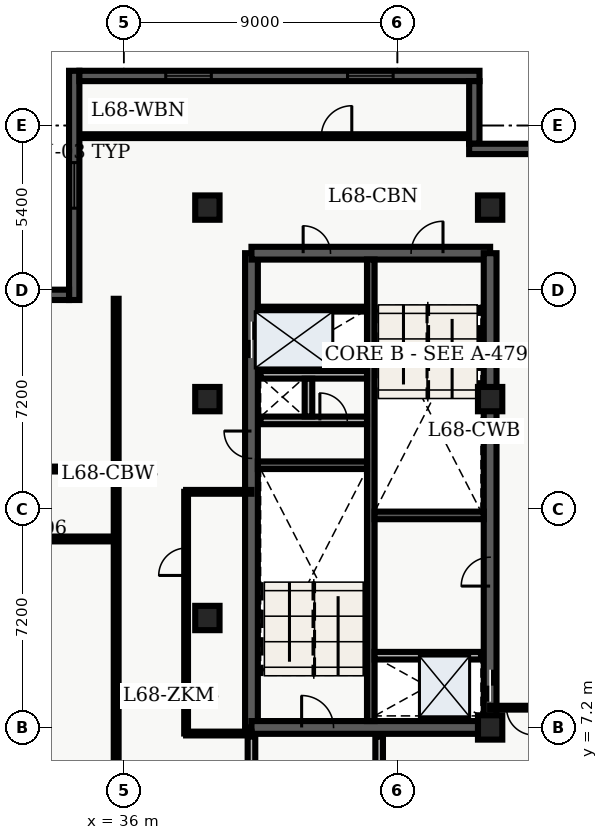
"""IFC4 building model, lengths in metres.
Left out: names, types, materials, properties, quantities, classifications, styles, units other than length and angle.
Written with IfcOpenShell. Run it as: python <this file> out.ifc"""

import sys

from ifc_helpers import new_model, entity, si_unit, converted_unit, direction, frame, origin_with_axes, origin_2d_with_axis, place, context, subcontext, project, spatial, polyline, rectangle, outline, extrude, element, fill, save


model = new_model("IFC4")
c1 = context("Model", 3, precision=1e-05, world=origin_with_axes(), true_north=direction((0.0, 1.0)))
c2 = subcontext(c1, "Body", "Model", "MODEL_VIEW")
j1 = project(units=[si_unit("LENGTHUNIT", "METRE"), converted_unit("PLANEANGLEUNIT", "DEGREE", entity("IfcPlaneAngleMeasure", 0.017), si_unit("PLANEANGLEUNIT", "RADIAN"), dimensions=[0, 0, 0, 0, 0, 0, 0])], contexts=[c1])
p1 = place(None, origin_with_axes())
s1 = spatial("IfcSite", under=j1, at=p1, CompositionType="ELEMENT")
p2 = place(p1, origin_with_axes())
s2 = spatial("IfcBuilding", under=s1, at=p2, CompositionType="ELEMENT")
p3 = place(p2, frame((0.0, 0.0, 276.3), z_axis=(0.0, 0.0, 1.0), x_axis=(1.0, 0.0, 0.0)))
s3 = spatial("IfcBuildingStorey", under=s2, at=p3, CompositionType="ELEMENT", Elevation=276.3)
p4 = place(p3, frame((40.2, 7.2, 0.0), z_axis=(0.0, 0.0, 1.0), x_axis=(0.0, 1.0, 0.0)))
e1 = element("IfcWall", 1, at=p4, inside=s3, PredefinedType="SHEAR", context=c2, shape_type="SweptSolid", body=[
    extrude(outline(polyline([(0.0, -0.21), (15.6, -0.21), (15.6, 0.21), (0.0, 0.21), (0.0, -0.21)])), origin_with_axes(), (0.0, 0.0, 1.0), 3.66),
])
p5 = place(p4, frame((12.75, 0.0, 0.0), z_axis=(0.0, 0.0, 1.0), x_axis=(1.0, 0.0, 0.0)))
e2 = element("IfcOpeningElement", 2, at=p5, cuts=e1, PredefinedType="OPENING", context=c2, shape_type="SweptSolid", body=[
    extrude(rectangle(XDim=1.2, YDim=0.44, at=origin_2d_with_axis()), origin_with_axes(), (0.0, 0.0, 1.0), 2.15),
])
p6 = place(p4, frame((9.3, 0.0, 0.0), z_axis=(0.0, 0.0, 1.0), x_axis=(1.0, 0.0, 0.0)))
e3 = element("IfcOpeningElement", 3, at=p6, cuts=e1, PredefinedType="OPENING", context=c2, shape_type="SweptSolid", body=[
    extrude(rectangle(XDim=0.9, YDim=0.44, at=origin_2d_with_axis()), origin_with_axes(), (0.0, 0.0, 1.0), 2.15),
])
p7 = place(p3, frame((40.2, 7.2, 0.0), z_axis=(0.0, 0.0, 1.0), x_axis=(1.0, 0.0, 0.0)))
e4 = element("IfcWall", 4, at=p7, inside=s3, PredefinedType="SHEAR", context=c2, shape_type="SweptSolid", body=[
    extrude(outline(polyline([(0.0, -0.21), (7.85, -0.21), (7.85, 0.21), (0.0, 0.21), (0.0, -0.21)])), origin_with_axes(), (0.0, 0.0, 1.0), 3.66),
])
p8 = place(p7, frame((2.175, 0.0, 0.0), z_axis=(0.0, 0.0, 1.0), x_axis=(1.0, 0.0, 0.0)))
e5 = element("IfcOpeningElement", 5, at=p8, cuts=e4, PredefinedType="OPENING", context=c2, shape_type="SweptSolid", body=[
    extrude(rectangle(XDim=1.05, YDim=0.44, at=origin_2d_with_axis()), origin_with_axes(), (0.0, 0.0, 1.0), 2.15),
])
p9 = place(p3, frame((40.2, 22.8, 0.0), z_axis=(0.0, 0.0, 1.0), x_axis=(1.0, 0.0, 0.0)))
e6 = element("IfcWall", 6, at=p9, inside=s3, PredefinedType="SHEAR", context=c2, shape_type="SweptSolid", body=[
    extrude(outline(polyline([(0.0, -0.21), (7.85, -0.21), (7.85, 0.21), (0.0, 0.21), (0.0, -0.21)])), origin_with_axes(), (0.0, 0.0, 1.0), 3.66),
])
p10 = place(p9, frame((5.775, 0.0, 0.0), z_axis=(0.0, 0.0, 1.0), x_axis=(1.0, 0.0, 0.0)))
e7 = element("IfcOpeningElement", 7, at=p10, cuts=e6, PredefinedType="OPENING", context=c2, shape_type="SweptSolid", body=[
    extrude(rectangle(XDim=1.05, YDim=0.44, at=origin_2d_with_axis()), origin_with_axes(), (0.0, 0.0, 1.0), 2.15),
])
p11 = place(p9, frame((2.15, 0.0, 0.0), z_axis=(0.0, 0.0, 1.0), x_axis=(1.0, 0.0, 0.0)))
e8 = element("IfcOpeningElement", 8, at=p11, cuts=e6, PredefinedType="OPENING", context=c2, shape_type="SweptSolid", body=[
    extrude(rectangle(XDim=0.9, YDim=0.44, at=origin_2d_with_axis()), origin_with_axes(), (0.0, 0.0, 1.0), 2.15),
])
p12 = place(p3, frame((48.05, 7.2, 0.0), z_axis=(0.0, 0.0, 1.0), x_axis=(0.0, 1.0, 0.0)))
e9 = element("IfcWall", 9, at=p12, inside=s3, PredefinedType="SHEAR", context=c2, shape_type="SweptSolid", body=[
    extrude(outline(polyline([(0.0, -0.21), (15.6, -0.21), (15.6, 0.21), (0.0, 0.21), (0.0, -0.21)])), origin_with_axes(), (0.0, 0.0, 1.0), 3.66),
])
p13 = place(p12, frame((1.375, 0.0, 0.0), z_axis=(0.0, 0.0, 1.0), x_axis=(1.0, 0.0, 0.0)))
e10 = element("IfcOpeningElement", 10, at=p13, cuts=e9, PredefinedType="OPENING", context=c2, shape_type="SweptSolid", body=[
    extrude(rectangle(XDim=1.05, YDim=0.44, at=origin_2d_with_axis()), origin_with_axes(), (0.0, 0.0, 1.0), 2.15),
])
p14 = place(p12, frame((5.125, 0.0, 0.0), z_axis=(0.0, 0.0, 1.0), x_axis=(1.0, 0.0, 0.0)))
e11 = element("IfcOpeningElement", 11, at=p14, cuts=e9, PredefinedType="OPENING", context=c2, shape_type="SweptSolid", body=[
    extrude(rectangle(XDim=0.95, YDim=0.44, at=origin_2d_with_axis()), origin_with_axes(), (0.0, 0.0, 1.0), 2.15),
])
p15 = place(p3, frame((44.125, 7.41, 0.0), z_axis=(0.0, 0.0, 1.0), x_axis=(0.0, 1.0, 0.0)))
e12 = element("IfcWall", 12, at=p15, inside=s3, PredefinedType="SHEAR", context=c2, shape_type="SweptSolid", body=[
    extrude(outline(polyline([(0.0, -0.125), (15.18, -0.125), (15.18, 0.125), (0.0, 0.125), (0.0, -0.125)])), origin_with_axes(), (0.0, 0.0, 1.0), 3.66),
])
for number, where, z_axis, x_axis in (
    (13, (40.41, 15.825, 0.0), (0.0, 0.0, 1.0), (1.0, 0.0, 0.0)),
    (14, (44.25, 14.175, 0.0), (0.0, 0.0, 1.0), (1.0, 0.0, 0.0)),
):
    element("IfcWall", number, at=place(p3, frame(where, z_axis=z_axis, x_axis=x_axis)), inside=s3, PredefinedType="SHEAR", context=c2, shape_type="SweptSolid", body=[
        extrude(outline(polyline([(0.0, -0.125), (3.59, -0.125), (3.59, 0.125), (0.0, 0.125), (0.0, -0.125)])), origin_with_axes(), (0.0, 0.0, 1.0), 3.66),
    ])
p16 = place(p3, frame((40.5, 17.3, 0.0), z_axis=(0.0, 0.0, 1.0), x_axis=(1.0, 0.0, 0.0)))
e15 = element("IfcWall", 15, at=p16, inside=s3, PredefinedType="SOLIDWALL", context=c2, shape_type="SweptSolid", body=[
    extrude(outline(polyline([(0.0, -0.125), (3.5, -0.125), (3.5, 0.125), (0.0, 0.125), (0.0, -0.125)])), origin_with_axes(), (0.0, 0.0, 1.0), 2.7),
])
p17 = place(p16, frame((2.4, 0.0, 0.0), z_axis=(0.0, 0.0, 1.0), x_axis=(1.0, 0.0, 0.0)))
e16 = element("IfcOpeningElement", 16, at=p17, cuts=e15, PredefinedType="OPENING", context=c2, shape_type="SweptSolid", body=[
    extrude(rectangle(XDim=0.9, YDim=0.27, at=origin_2d_with_axis()), origin_with_axes(), (0.0, 0.0, 1.0), 2.15),
])
p18 = place(p3, frame((40.5, 18.8, 0.0), z_axis=(0.0, 0.0, 1.0), x_axis=(1.0, 0.0, 0.0)))
e17 = element("IfcWall", 17, at=p18, inside=s3, PredefinedType="SOLIDWALL", context=c2, shape_type="SweptSolid", body=[
    extrude(outline(polyline([(0.0, -0.125), (3.5, -0.125), (3.5, 0.125), (0.0, 0.125), (0.0, -0.125)])), origin_with_axes(), (0.0, 0.0, 1.0), 2.7),
])
p19 = place(p3, frame((42.075, 17.43, 0.0), z_axis=(0.0, 0.0, 1.0), x_axis=(0.0, 1.0, 0.0)))
e18 = element("IfcWall", 18, at=p19, inside=s3, PredefinedType="SOLIDWALL", context=c2, shape_type="SweptSolid", body=[
    extrude(outline(polyline([(0.0, -0.125), (1.24, -0.125), (1.24, 0.125), (0.0, 0.125), (0.0, -0.125)])), origin_with_axes(), (0.0, 0.0, 1.0), 2.7),
])
p20 = place(p3, frame((40.2, 3.1, 0.0), z_axis=(0.0, 0.0, 1.0), x_axis=(0.0, 1.0, 0.0)))
e19 = element("IfcWall", 19, at=p20, inside=s3, PredefinedType="SOLIDWALL", context=c2, shape_type="SweptSolid", body=[
    extrude(outline(polyline([(0.0, -0.125), (3.8, -0.125), (3.8, 0.125), (0.0, 0.125), (0.0, -0.125)])), origin_with_axes(), (0.0, 0.0, 1.0), 2.7),
])
p21 = place(p20, frame((2.075, 0.0, 0.0), z_axis=(0.0, 0.0, 1.0), x_axis=(1.0, 0.0, 0.0)))
e20 = element("IfcOpeningElement", 20, at=p21, cuts=e19, PredefinedType="OPENING", context=c2, shape_type="SweptSolid", body=[
    extrude(rectangle(XDim=1.05, YDim=0.27, at=origin_2d_with_axis()), origin_with_axes(), (0.0, 0.0, 1.0), 2.15),
])
p22 = place(p3, frame((44.4, 3.1, 0.0), z_axis=(0.0, 0.0, 1.0), x_axis=(0.0, 1.0, 0.0)))
e21 = element("IfcWall", 21, at=p22, inside=s3, PredefinedType="SOLIDWALL", context=c2, shape_type="SweptSolid", body=[
    extrude(outline(polyline([(0.0, -0.125), (3.8, -0.125), (3.8, 0.125), (0.0, 0.125), (0.0, -0.125)])), origin_with_axes(), (0.0, 0.0, 1.0), 2.7),
])
for number, where, z_axis, x_axis in (
    (22, (38.75, 10.8, 0.0), (0.0, 0.0, 1.0), (1.0, 0.0, 0.0)),
    (23, (38.75, 18.0, 0.0), (0.0, 0.0, 1.0), (1.0, 0.0, 0.0)),
    (24, (38.75, 24.3, 0.0), (0.0, 0.0, 1.0), (1.0, 0.0, 0.0)),
    (25, (48.05, 7.2, 0.0), (0.0, 0.0, 1.0), (1.0, 0.0, 0.0)),
    (26, (48.05, 18.0, 0.0), (0.0, 0.0, 1.0), (1.0, 0.0, 0.0)),
    (27, (48.05, 24.3, 0.0), (0.0, 0.0, 1.0), (1.0, 0.0, 0.0)),
):
    element("IfcColumn", number, at=place(p3, frame(where, z_axis=z_axis, x_axis=x_axis)), inside=s3, PredefinedType="COLUMN", context=c2, shape_type="SweptSolid", body=[
        extrude(rectangle(XDim=0.8, YDim=0.8, at=origin_2d_with_axis()), origin_with_axes(), (0.0, 0.0, 1.0), 3.9),
    ])
p23 = place(p3, frame((40.5, 20.96, 0.0), z_axis=(0.0, 0.0, 1.0), x_axis=(1.0, 0.0, 0.0)))
e28 = element("IfcWall", 28, at=p23, inside=s3, PredefinedType="PARTITIONING", context=c2, shape_type="SweptSolid", body=[
    extrude(outline(polyline([(0.0, -0.08), (3.5, -0.08), (3.5, 0.08), (0.0, 0.08), (0.0, -0.08)])), origin_with_axes(), (0.0, 0.0, 1.0), 2.7),
])
p24 = place(p3, frame((44.25, 9.56, 0.0), z_axis=(0.0, 0.0, 1.0), x_axis=(1.0, 0.0, 0.0)))
e29 = element("IfcWall", 29, at=p24, inside=s3, PredefinedType="SOLIDWALL", context=c2, shape_type="SweptSolid", body=[
    extrude(outline(polyline([(0.0, -0.125), (3.5, -0.125), (3.5, 0.125), (0.0, 0.125), (0.0, -0.125)])), origin_with_axes(), (0.0, 0.0, 1.0), 2.7),
])
p25 = place(p3, frame((20.3, 13.4, 0.0), z_axis=(0.0, 0.0, 1.0), x_axis=(1.0, 0.0, 0.0)))
e30 = element("IfcWall", 30, at=p25, inside=s3, PredefinedType="PARTITIONING", context=c2, shape_type="SweptSolid", body=[
    extrude(outline(polyline([(0.0, -0.08), (15.45, -0.08), (15.45, 0.08), (0.0, 0.08), (0.0, -0.08)])), origin_with_axes(), (0.0, 0.0, 1.0), 2.7),
])
p26 = place(p25, frame((2.34, 0.0, 0.0), z_axis=(0.0, 0.0, 1.0), x_axis=(1.0, 0.0, 0.0)))
e31 = element("IfcOpeningElement", 31, at=p26, cuts=e30, PredefinedType="OPENING", context=c2, shape_type="SweptSolid", body=[
    extrude(rectangle(XDim=1.0, YDim=0.18, at=origin_2d_with_axis()), origin_with_axes(), (0.0, 0.0, 1.0), 2.15),
])
p27 = place(p25, frame((7.011, 0.0, 0.0), z_axis=(0.0, 0.0, 1.0), x_axis=(1.0, 0.0, 0.0)))
e32 = element("IfcOpeningElement", 32, at=p27, cuts=e30, PredefinedType="OPENING", context=c2, shape_type="SweptSolid", body=[
    extrude(rectangle(XDim=1.0, YDim=0.18, at=origin_2d_with_axis()), origin_with_axes(), (0.0, 0.0, 1.0), 2.15),
])
p28 = place(p25, frame((12.445, 0.0, 0.0), z_axis=(0.0, 0.0, 1.0), x_axis=(1.0, 0.0, 0.0)))
e33 = element("IfcOpeningElement", 33, at=p28, cuts=e30, PredefinedType="OPENING", context=c2, shape_type="SweptSolid", body=[
    extrude(rectangle(XDim=1.2, YDim=0.18, at=origin_2d_with_axis()), origin_with_axes(), (0.0, 0.0, 1.0), 2.2),
])
p29 = place(p3, frame((20.3, 15.7, 0.0), z_axis=(0.0, 0.0, 1.0), x_axis=(1.0, 0.0, 0.0)))
e34 = element("IfcWall", 34, at=p29, inside=s3, PredefinedType="PARTITIONING", context=c2, shape_type="SweptSolid", body=[
    extrude(outline(polyline([(0.0, -0.08), (15.45, -0.08), (15.45, 0.08), (0.0, 0.08), (0.0, -0.08)])), origin_with_axes(), (0.0, 0.0, 1.0), 2.7),
])
p30 = place(p29, frame((7.775, 0.0, 0.0), z_axis=(0.0, 0.0, 1.0), x_axis=(1.0, 0.0, 0.0)))
e35 = element("IfcOpeningElement", 35, at=p30, cuts=e34, PredefinedType="OPENING", context=c2, shape_type="SweptSolid", body=[
    extrude(rectangle(XDim=1.0, YDim=0.18, at=origin_2d_with_axis()), origin_with_axes(), (0.0, 0.0, 1.0), 2.15),
])
p31 = place(p3, frame((35.75, 4.35, 0.0), z_axis=(0.0, 0.0, 1.0), x_axis=(0.0, 1.0, 0.0)))
e36 = element("IfcWall", 36, at=p31, inside=s3, PredefinedType="PARTITIONING", context=c2, shape_type="SweptSolid", body=[
    extrude(outline(polyline([(0.0, -0.08), (16.95, -0.08), (16.95, 0.08), (0.0, 0.08), (0.0, -0.08)])), origin_with_axes(), (0.0, 0.0, 1.0), 2.7),
])
p32 = place(p3, frame((49.765, 7.85, 0.0), z_axis=(0.0, 0.0, 1.0), x_axis=(-1.0, 0.0, 0.0)))
e37 = element("IfcWall", 37, at=p32, inside=s3, PredefinedType="PARTITIONING", context=c2, shape_type="SweptSolid", body=[
    extrude(outline(polyline([(0.0, -0.062), (1.715, -0.062), (1.715, 0.062), (0.0, 0.062), (0.0, -0.062)])), origin_with_axes(), (0.0, 0.0, 1.0), 2.7),
])
p33 = place(p32, frame((0.725, 0.0, 0.0), z_axis=(0.0, 0.0, 1.0), x_axis=(1.0, 0.0, 0.0)))
e38 = element("IfcOpeningElement", 38, at=p33, cuts=e37, PredefinedType="OPENING", context=c2, shape_type="SweptSolid", body=[
    extrude(rectangle(XDim=0.9, YDim=0.145, at=origin_2d_with_axis()), origin_with_axes(), (0.0, 0.0, 1.0), 2.15),
])
p34 = place(p3, frame((34.535, 26.65, 0.0), z_axis=(0.0, 0.0, 1.0), x_axis=(1.0, 0.0, 0.0)))
e39 = element("IfcWall", 39, at=p34, inside=s3, PredefinedType="PARTITIONING", context=c2, shape_type="SweptSolid", body=[
    extrude(outline(polyline([(0.0, -0.062), (12.995, -0.062), (12.995, 0.062), (0.0, 0.062), (0.0, -0.062)])), origin_with_axes(), (0.0, 0.0, 1.0), 2.7),
])
p35 = place(p34, frame((8.465, 0.0, 0.0), z_axis=(0.0, 0.0, 1.0), x_axis=(1.0, 0.0, 0.0)))
e40 = element("IfcOpeningElement", 40, at=p35, cuts=e39, PredefinedType="OPENING", context=c2, shape_type="SweptSolid", body=[
    extrude(rectangle(XDim=1.0, YDim=0.145, at=origin_2d_with_axis()), origin_with_axes(), (0.0, 0.0, 1.0), 2.15),
])
for number, where, z_axis, x_axis in (
    (41, (38.05, 7.0, 0.0), (0.0, 0.0, 1.0), (1.0, 0.0, 0.0)),
    (42, (38.05, 14.95, 0.0), (0.0, 0.0, 1.0), (1.0, 0.0, 0.0)),
):
    element("IfcWall", number, at=place(p3, frame(where, z_axis=z_axis, x_axis=x_axis)), inside=s3, PredefinedType="PARTITIONING", context=c2, shape_type="SweptSolid", body=[
        extrude(outline(polyline([(0.0, -0.062), (2.15, -0.062), (2.15, 0.062), (0.0, 0.062), (0.0, -0.062)])), origin_with_axes(), (0.0, 0.0, 1.0), 2.7),
    ])
p36 = place(p3, frame((38.05, 7.0, 0.0), z_axis=(0.0, 0.0, 1.0), x_axis=(0.0, 1.0, 0.0)))
e43 = element("IfcWall", 43, at=p36, inside=s3, PredefinedType="PARTITIONING", context=c2, shape_type="SweptSolid", body=[
    extrude(outline(polyline([(0.0, -0.062), (7.95, -0.062), (7.95, 0.062), (0.0, 0.062), (0.0, -0.062)])), origin_with_axes(), (0.0, 0.0, 1.0), 2.7),
])
p37 = place(p36, frame((5.65, 0.0, 0.0), z_axis=(0.0, 0.0, 1.0), x_axis=(1.0, 0.0, 0.0)))
e44 = element("IfcOpeningElement", 44, at=p37, cuts=e43, PredefinedType="OPENING", context=c2, shape_type="SweptSolid", body=[
    extrude(rectangle(XDim=0.9, YDim=0.145, at=origin_2d_with_axis()), origin_with_axes(), (0.0, 0.0, 1.0), 2.15),
])
p38 = place(p3, frame((34.37, 21.26, 0.0), z_axis=(0.0, 0.0, 1.0), x_axis=(0.0, 1.0, 0.0)))
e45 = element("IfcWall", 45, at=p38, inside=s3, PredefinedType="SOLIDWALL", context=c2, shape_type="SweptSolid", body=[
    extrude(outline(polyline([(0.0, -0.17), (7.54, -0.17), (7.54, 0.17), (0.0, 0.17), (0.0, -0.17)])), origin_with_axes(), (0.0, 0.0, 1.0), 3.66),
])
p39 = place(p38, frame((3.77, 0.0, 0.45), z_axis=(0.0, 0.0, 1.0), x_axis=(1.0, 0.0, 0.0)))
e46 = element("IfcOpeningElement", 46, at=p39, cuts=e45, PredefinedType="OPENING", context=c2, shape_type="SweptSolid", body=[
    extrude(rectangle(XDim=1.5, YDim=0.36, at=origin_2d_with_axis()), origin_with_axes(), (0.0, 0.0, 1.0), 2.1),
])
p40 = place(p3, frame((34.54, 28.63, 0.0), z_axis=(0.0, 0.0, 1.0), x_axis=(1.0, 0.0, 0.0)))
e47 = element("IfcWall", 47, at=p40, inside=s3, PredefinedType="SOLIDWALL", context=c2, shape_type="SweptSolid", body=[
    extrude(outline(polyline([(0.0, -0.17), (13.16, -0.17), (13.16, 0.17), (0.0, 0.17), (0.0, -0.17)])), origin_with_axes(), (0.0, 0.0, 1.0), 3.66),
])
p41 = place(p40, frame((3.59, 0.0, 0.45), z_axis=(0.0, 0.0, 1.0), x_axis=(1.0, 0.0, 0.0)))
e48 = element("IfcOpeningElement", 48, at=p41, cuts=e47, PredefinedType="OPENING", context=c2, shape_type="SweptSolid", body=[
    extrude(rectangle(XDim=1.5, YDim=0.36, at=origin_2d_with_axis()), origin_with_axes(), (0.0, 0.0, 1.0), 2.1),
])
p42 = place(p40, frame((9.57, 0.0, 0.45), z_axis=(0.0, 0.0, 1.0), x_axis=(1.0, 0.0, 0.0)))
e49 = element("IfcOpeningElement", 49, at=p42, cuts=e47, PredefinedType="OPENING", context=c2, shape_type="SweptSolid", body=[
    extrude(rectangle(XDim=1.5, YDim=0.36, at=origin_2d_with_axis()), origin_with_axes(), (0.0, 0.0, 1.0), 2.1),
])
p43 = place(p3, frame((47.53, 28.46, 0.0), z_axis=(0.0, 0.0, 1.0), x_axis=(0.0, -1.0, 0.0)))
e50 = element("IfcWall", 50, at=p43, inside=s3, PredefinedType="SOLIDWALL", context=c2, shape_type="SweptSolid", body=[
    extrude(outline(polyline([(0.0, -0.17), (2.06, -0.17), (2.06, 0.17), (0.0, 0.17), (0.0, -0.17)])), origin_with_axes(), (0.0, 0.0, 1.0), 3.66),
])
p44 = place(p3, frame((47.36, 26.23, 0.0), z_axis=(0.0, 0.0, 1.0), x_axis=(1.0, 0.0, 0.0)))
e51 = element("IfcWall", 51, at=p44, inside=s3, PredefinedType="SOLIDWALL", context=c2, shape_type="SweptSolid", body=[
    extrude(outline(polyline([(0.0, -0.17), (2.74, -0.17), (2.74, 0.17), (0.0, 0.17), (0.0, -0.17)])), origin_with_axes(), (0.0, 0.0, 1.0), 3.66),
])
p45 = place(p3, frame((32.06, 21.43, 0.0), z_axis=(0.0, 0.0, 1.0), x_axis=(1.0, 0.0, 0.0)))
e52 = element("IfcWall", 52, at=p45, inside=s3, PredefinedType="SOLIDWALL", context=c2, shape_type="SweptSolid", body=[
    extrude(outline(polyline([(0.0, -0.17), (2.14, -0.17), (2.14, 0.17), (0.0, 0.17), (0.0, -0.17)])), origin_with_axes(), (0.0, 0.0, 1.0), 3.66),
])
p46 = place(p12, frame((1.375, 0.0, 0.0), z_axis=(0.0, 0.0, 1.0), x_axis=(1.0, 0.0, 0.0)))
e53 = element("IfcDoor", 53, at=p46, inside=s3, OperationType="SLIDING_TO_LEFT", PredefinedType="DOOR", context=c2, shape_type="SweptSolid", body=[
    extrude(rectangle(XDim=1.05, YDim=0.09, at=origin_2d_with_axis()), origin_with_axes(), (0.0, 0.0, 1.0), 2.15),
])
fill(e10, e53)
p47 = place(p4, frame((12.75, 0.0, 0.0), z_axis=(0.0, 0.0, 1.0), x_axis=(1.0, 0.0, 0.0)))
e54 = element("IfcDoor", 54, at=p47, inside=s3, OperationType="DOUBLE_DOOR_SLIDING", PredefinedType="DOOR", context=c2, shape_type="SweptSolid", body=[
    extrude(rectangle(XDim=1.2, YDim=0.09, at=origin_2d_with_axis()), origin_with_axes(), (0.0, 0.0, 1.0), 2.15),
])
fill(e2, e54)
p48 = place(p4, frame((9.3, 0.0, 0.0), z_axis=(0.0, 0.0, 1.0), x_axis=(1.0, 0.0, 0.0)))
e55 = element("IfcDoor", 55, at=p48, inside=s3, OperationType="SINGLE_SWING_RIGHT", PredefinedType="DOOR", context=c2, shape_type="SweptSolid", body=[
    extrude(rectangle(XDim=0.9, YDim=0.09, at=origin_2d_with_axis()), origin_with_axes(), (0.0, 0.0, 1.0), 2.15),
])
fill(e3, e55)
p49 = place(p16, frame((2.4, 0.0, 0.0), z_axis=(0.0, 0.0, 1.0), x_axis=(1.0, 0.0, 0.0)))
e56 = element("IfcDoor", 56, at=p49, inside=s3, OperationType="SINGLE_SWING_LEFT", PredefinedType="DOOR", context=c2, shape_type="SweptSolid", body=[
    extrude(rectangle(XDim=0.9, YDim=0.09, at=origin_2d_with_axis()), origin_with_axes(), (0.0, 0.0, 1.0), 2.15),
])
fill(e16, e56)
p50 = place(p7, frame((2.175, 0.0, 0.0), z_axis=(0.0, 0.0, 1.0), x_axis=(1.0, 0.0, 0.0)))
e57 = element("IfcDoor", 57, at=p50, inside=s3, OperationType="SINGLE_SWING_LEFT", PredefinedType="DOOR", context=c2, shape_type="SweptSolid", body=[
    extrude(rectangle(XDim=1.05, YDim=0.09, at=origin_2d_with_axis()), origin_with_axes(), (0.0, 0.0, 1.0), 2.15),
])
fill(e5, e57)
p51 = place(p9, frame((5.775, 0.0, 0.0), z_axis=(0.0, 0.0, 1.0), x_axis=(1.0, 0.0, 0.0)))
e58 = element("IfcDoor", 58, at=p51, inside=s3, OperationType="SINGLE_SWING_RIGHT", PredefinedType="DOOR", context=c2, shape_type="SweptSolid", body=[
    extrude(rectangle(XDim=1.05, YDim=0.09, at=origin_2d_with_axis()), origin_with_axes(), (0.0, 0.0, 1.0), 2.15),
])
fill(e7, e58)
p52 = place(p9, frame((2.15, 0.0, 0.0), z_axis=(0.0, 0.0, 1.0), x_axis=(1.0, 0.0, 0.0)))
e59 = element("IfcDoor", 59, at=p52, inside=s3, OperationType="SINGLE_SWING_LEFT", PredefinedType="DOOR", context=c2, shape_type="SweptSolid", body=[
    extrude(rectangle(XDim=0.9, YDim=0.09, at=origin_2d_with_axis()), origin_with_axes(), (0.0, 0.0, 1.0), 2.15),
])
fill(e8, e59)
p53 = place(p12, frame((5.125, 0.0, 0.0), z_axis=(0.0, 0.0, 1.0), x_axis=(1.0, 0.0, 0.0)))
e60 = element("IfcDoor", 60, at=p53, inside=s3, OperationType="SINGLE_SWING_LEFT", PredefinedType="DOOR", context=c2, shape_type="SweptSolid", body=[
    extrude(rectangle(XDim=0.95, YDim=0.09, at=origin_2d_with_axis()), origin_with_axes(), (0.0, 0.0, 1.0), 2.15),
])
fill(e11, e60)
p54 = place(p32, frame((0.725, 0.0, 0.0), z_axis=(0.0, 0.0, 1.0), x_axis=(1.0, 0.0, 0.0)))
e61 = element("IfcDoor", 61, at=p54, inside=s3, OperationType="SINGLE_SWING_LEFT", PredefinedType="DOOR", context=c2, shape_type="SweptSolid", body=[
    extrude(rectangle(XDim=0.9, YDim=0.075, at=origin_2d_with_axis()), origin_with_axes(), (0.0, 0.0, 1.0), 2.15),
])
fill(e38, e61)
p55 = place(p34, frame((8.465, 0.0, 0.0), z_axis=(0.0, 0.0, 1.0), x_axis=(1.0, 0.0, 0.0)))
e62 = element("IfcDoor", 62, at=p55, inside=s3, OperationType="SINGLE_SWING_RIGHT", PredefinedType="DOOR", context=c2, shape_type="SweptSolid", body=[
    extrude(rectangle(XDim=1.0, YDim=0.075, at=origin_2d_with_axis()), origin_with_axes(), (0.0, 0.0, 1.0), 2.15),
])
fill(e40, e62)
p56 = place(p36, frame((5.65, 0.0, 0.0), z_axis=(0.0, 0.0, 1.0), x_axis=(1.0, 0.0, 0.0)))
e63 = element("IfcDoor", 63, at=p56, inside=s3, OperationType="SINGLE_SWING_LEFT", PredefinedType="DOOR", context=c2, shape_type="SweptSolid", body=[
    extrude(rectangle(XDim=0.9, YDim=0.075, at=origin_2d_with_axis()), origin_with_axes(), (0.0, 0.0, 1.0), 2.15),
])
fill(e44, e63)
p57 = place(p38, frame((3.77, 0.0, 0.45), z_axis=(0.0, 0.0, 1.0), x_axis=(1.0, 0.0, 0.0)))
e64 = element("IfcWindow", 64, at=p57, inside=s3, PredefinedType="WINDOW", context=c2, shape_type="SweptSolid", body=[
    extrude(rectangle(XDim=1.5, YDim=0.09, at=origin_2d_with_axis()), origin_with_axes(), (0.0, 0.0, 1.0), 2.1),
])
fill(e46, e64)
p58 = place(p40, frame((3.59, 0.0, 0.45), z_axis=(0.0, 0.0, 1.0), x_axis=(1.0, 0.0, 0.0)))
e65 = element("IfcWindow", 65, at=p58, inside=s3, PredefinedType="WINDOW", context=c2, shape_type="SweptSolid", body=[
    extrude(rectangle(XDim=1.5, YDim=0.09, at=origin_2d_with_axis()), origin_with_axes(), (0.0, 0.0, 1.0), 2.1),
])
fill(e48, e65)
p59 = place(p40, frame((9.57, 0.0, 0.45), z_axis=(0.0, 0.0, 1.0), x_axis=(1.0, 0.0, 0.0)))
e66 = element("IfcWindow", 66, at=p59, inside=s3, PredefinedType="WINDOW", context=c2, shape_type="SweptSolid", body=[
    extrude(rectangle(XDim=1.5, YDim=0.09, at=origin_2d_with_axis()), origin_with_axes(), (0.0, 0.0, 1.0), 2.1),
])
fill(e49, e66)
save(model, sys.argv[1])
